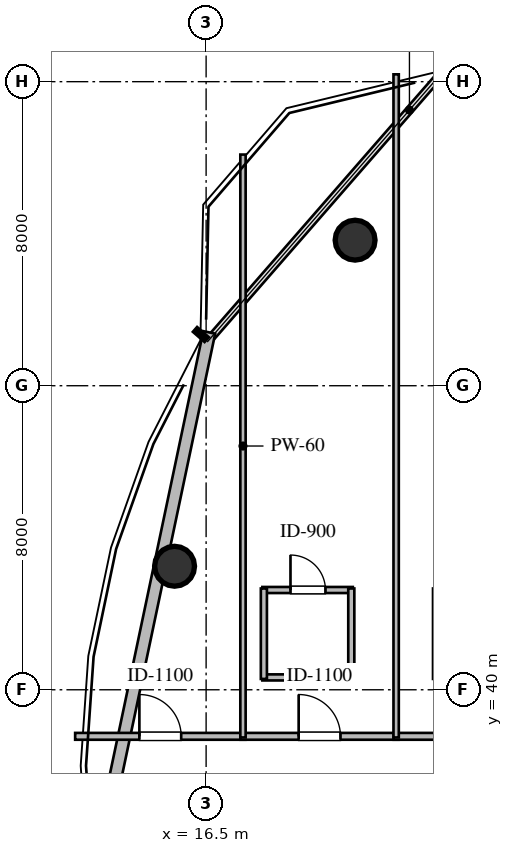
"""IFC4 building model, lengths in metres.
Left out: names, types, materials, properties, quantities, classifications, styles, units other than length and angle.
Written with IfcOpenShell. Run it as: python <this file> out.ifc"""

import sys

from ifc_helpers import new_model, si_unit, direction, frame, frame_2d, origin, origin_2d, place, context, subcontext, project, spatial, rectangle, circle, extrude, element, fill, save


model = new_model("IFC4")
c1 = context("Model", 3, precision=1e-05, world=origin(), true_north=direction((0.0, 1.0)))
c2 = subcontext(c1, "Body", "Model", "MODEL_VIEW")
j1 = project(units=[si_unit("LENGTHUNIT", "METRE"), si_unit("PLANEANGLEUNIT", "RADIAN")], contexts=[c1])
p1 = place(None, origin())
s1 = spatial("IfcSite", under=j1, at=p1, CompositionType="ELEMENT")
p2 = place(p1, origin())
s2 = spatial("IfcBuilding", under=s1, at=p2, CompositionType="ELEMENT")
p3 = place(p2, frame((0.0, 0.0, 249.6)))
s3 = spatial("IfcBuildingStorey", under=s2, at=p3, CompositionType="ELEMENT", Elevation=249.6)
for number, where, z_axis, x_axis in (
    (1, (20.42, 51.83, 0.0), (0.0, 0.0, 1.0), (1.0, 0.0, 0.0)),
    (2, (15.67, 43.25, 0.0), (0.0, 0.0, 1.0), (1.0, 0.0, 0.0)),
):
    element("IfcColumn", number, at=place(p3, frame(where, z_axis=z_axis, x_axis=x_axis)), inside=s3, PredefinedType="COLUMN", context=c2, shape_type="SweptSolid", body=[
        extrude(circle(Radius=0.525, at=origin_2d()), origin(), (0.0, 0.0, 1.0), 3.6),
    ])
p4 = place(p3, frame((13.525, 34.903, 0.0), z_axis=(0.0, 0.0, 1.0), x_axis=(0.206301080321, 0.978488561128, 0.0)))
e3 = element("IfcWall", 3, at=p4, inside=s3, PredefinedType="STANDARD", context=c2, shape_type="SweptSolid", body=[
    extrude(rectangle(XDim=14.819, YDim=0.32, at=frame_2d((7.409, 0.0))), origin(), (0.0, 0.0, 1.0), 2.726),
])
p5 = place(p3, frame((17.98, 40.325, 0.0), z_axis=(0.0, 0.0, 1.0), x_axis=(1.0, 0.0, 0.0)))
e4 = element("IfcWall", 4, at=p5, inside=s3, PredefinedType="PLUMBINGWALL", context=c2, shape_type="SweptSolid", body=[
    extrude(rectangle(XDim=2.38, YDim=0.16, at=frame_2d((1.19, 0.0))), origin(), (0.0, 0.0, 1.0), 3.28),
])
p6 = place(p3, frame((17.98, 42.625, 0.0), z_axis=(0.0, 0.0, 1.0), x_axis=(1.0, 0.0, 0.0)))
e5 = element("IfcWall", 5, at=p6, inside=s3, PredefinedType="PLUMBINGWALL", context=c2, shape_type="SweptSolid", body=[
    extrude(rectangle(XDim=2.38, YDim=0.16, at=frame_2d((1.19, 0.0))), origin(), (0.0, 0.0, 1.0), 3.28),
])
p7 = place(p6, frame((0.74, 0.0, 0.0)))
e6 = element("IfcOpeningElement", 6, at=p7, cuts=e5, PredefinedType="OPENING", context=c2, shape_type="SweptSolid", body=[
    extrude(rectangle(XDim=0.92, YDim=2.1, at=frame_2d((0.46, 1.05))), frame((0.0, 0.09, 0.0), z_axis=(0.0, -1.0, 0.0), x_axis=(1.0, 0.0, 0.0)), (0.0, 0.0, 1.0), 0.18),
])
for number, where, z_axis, x_axis in (
    (7, (18.02, 40.285, 0.0), (0.0, 0.0, 1.0), (0.0, 1.0, 0.0)),
    (8, (20.32, 40.285, 0.0), (0.0, 0.0, 1.0), (0.0, 1.0, 0.0)),
):
    element("IfcWall", number, at=place(p3, frame(where, z_axis=z_axis, x_axis=x_axis)), inside=s3, PredefinedType="PLUMBINGWALL", context=c2, shape_type="SweptSolid", body=[
        extrude(rectangle(XDim=2.38, YDim=0.16, at=frame_2d((1.19, 0.0))), origin(), (0.0, 0.0, 1.0), 3.28),
    ])
p8 = place(p3, frame((22.55, 40.285, 0.0), z_axis=(0.0, 0.0, 1.0), x_axis=(0.0, 1.0, 0.0)))
e9 = element("IfcWall", 9, at=p8, inside=s3, PredefinedType="PLUMBINGWALL", context=c2, shape_type="SweptSolid", body=[
    extrude(rectangle(XDim=2.38, YDim=0.16, at=frame_2d((1.19, 0.0))), origin(), (0.0, 0.0, 1.0), 2.726),
])
p9 = place(p3, frame((13.054, 38.775, 0.0), z_axis=(0.0, 0.0, 1.0), x_axis=(1.0, 0.0, 0.0)))
e10 = element("IfcWall", 10, at=p9, inside=s3, PredefinedType="PARTITIONING", context=c2, shape_type="SweptSolid", body=[
    extrude(rectangle(XDim=4.481, YDim=0.18, at=frame_2d((2.24, 0.0))), origin(), (0.0, 0.0, 1.0), 3.28),
])
p10 = place(p9, frame((1.69, 0.0, 0.0)))
e11 = element("IfcOpeningElement", 11, at=p10, cuts=e10, PredefinedType="OPENING", context=c2, shape_type="SweptSolid", body=[
    extrude(rectangle(XDim=1.1, YDim=2.1, at=frame_2d((0.55, 1.05))), frame((0.0, 0.1, 0.0), z_axis=(0.0, -1.0, 0.0), x_axis=(1.0, 0.0, 0.0)), (0.0, 0.0, 1.0), 0.2),
])
p11 = place(p3, frame((17.405, 38.775, 0.0), z_axis=(0.0, 0.0, 1.0), x_axis=(1.0, 0.0, 0.0)))
e12 = element("IfcWall", 12, at=p11, inside=s3, PredefinedType="PARTITIONING", context=c2, shape_type="SweptSolid", body=[
    extrude(rectangle(XDim=4.16, YDim=0.18, at=frame_2d((2.08, 0.0))), origin(), (0.0, 0.0, 1.0), 3.28),
])
p12 = place(p11, frame((1.53, 0.0, 0.0)))
e13 = element("IfcOpeningElement", 13, at=p12, cuts=e12, PredefinedType="OPENING", context=c2, shape_type="SweptSolid", body=[
    extrude(rectangle(XDim=1.1, YDim=2.1, at=frame_2d((0.55, 1.05))), frame((0.0, 0.1, 0.0), z_axis=(0.0, -1.0, 0.0), x_axis=(1.0, 0.0, 0.0)), (0.0, 0.0, 1.0), 0.2),
])
p13 = place(p3, frame((21.435, 38.775, 0.0), z_axis=(0.0, 0.0, 1.0), x_axis=(1.0, 0.0, 0.0)))
e14 = element("IfcWall", 14, at=p13, inside=s3, PredefinedType="PARTITIONING", context=c2, shape_type="SweptSolid", body=[
    extrude(rectangle(XDim=4.63, YDim=0.18, at=frame_2d((2.315, 0.0))), origin(), (0.0, 0.0, 1.0), 3.28),
])
p14 = place(p13, frame((1.765, 0.0, 0.0)))
e15 = element("IfcOpeningElement", 15, at=p14, cuts=e14, PredefinedType="OPENING", context=c2, shape_type="SweptSolid", body=[
    extrude(rectangle(XDim=1.1, YDim=2.1, at=frame_2d((0.55, 1.05))), frame((0.0, 0.1, 0.0), z_axis=(0.0, -1.0, 0.0), x_axis=(1.0, 0.0, 0.0)), (0.0, 0.0, 1.0), 0.2),
])
p15 = place(p3, frame((17.47, 54.082, 0.0), z_axis=(0.0, 0.0, 1.0), x_axis=(0.0, -1.0, 0.0)))
e16 = element("IfcWall", 16, at=p15, inside=s3, PredefinedType="PARTITIONING", context=c2, shape_type="SweptSolid", body=[
    extrude(rectangle(XDim=15.337, YDim=0.14, at=frame_2d((7.668, 0.0))), origin(), (0.0, 0.0, 1.0), 3.28),
])
p16 = place(p3, frame((21.5, 56.193, 0.0), z_axis=(0.0, 0.0, 1.0), x_axis=(0.0, -1.0, 0.0)))
e17 = element("IfcWall", 17, at=p16, inside=s3, PredefinedType="PARTITIONING", context=c2, shape_type="SweptSolid", body=[
    extrude(rectangle(XDim=17.448, YDim=0.14, at=frame_2d((8.724, 0.0))), origin(), (0.0, 0.0, 1.0), 2.726),
])
p17 = place(p7, origin())
e18 = element("IfcDoor", 18, at=p17, inside=s3, OperationType="SINGLE_SWING_LEFT", PredefinedType="DOOR", context=c2, shape_type="SweptSolid", body=[
    extrude(rectangle(XDim=0.92, YDim=2.1, at=frame_2d((0.46, 1.05))), frame((0.0, 0.025, 0.0), z_axis=(0.0, -1.0, 0.0), x_axis=(1.0, 0.0, 0.0)), (0.0, 0.0, 1.0), 0.05),
])
fill(e6, e18)
p18 = place(p10, origin())
e19 = element("IfcDoor", 19, at=p18, inside=s3, OperationType="SINGLE_SWING_LEFT", PredefinedType="DOOR", context=c2, shape_type="SweptSolid", body=[
    extrude(rectangle(XDim=1.1, YDim=2.1, at=frame_2d((0.55, 1.05))), frame((0.0, 0.025, 0.0), z_axis=(0.0, -1.0, 0.0), x_axis=(1.0, 0.0, 0.0)), (0.0, 0.0, 1.0), 0.05),
])
fill(e11, e19)
p19 = place(p12, origin())
e20 = element("IfcDoor", 20, at=p19, inside=s3, OperationType="SINGLE_SWING_LEFT", PredefinedType="DOOR", context=c2, shape_type="SweptSolid", body=[
    extrude(rectangle(XDim=1.1, YDim=2.1, at=frame_2d((0.55, 1.05))), frame((0.0, 0.025, 0.0), z_axis=(0.0, -1.0, 0.0), x_axis=(1.0, 0.0, 0.0)), (0.0, 0.0, 1.0), 0.05),
])
fill(e13, e20)
save(model, sys.argv[1])
